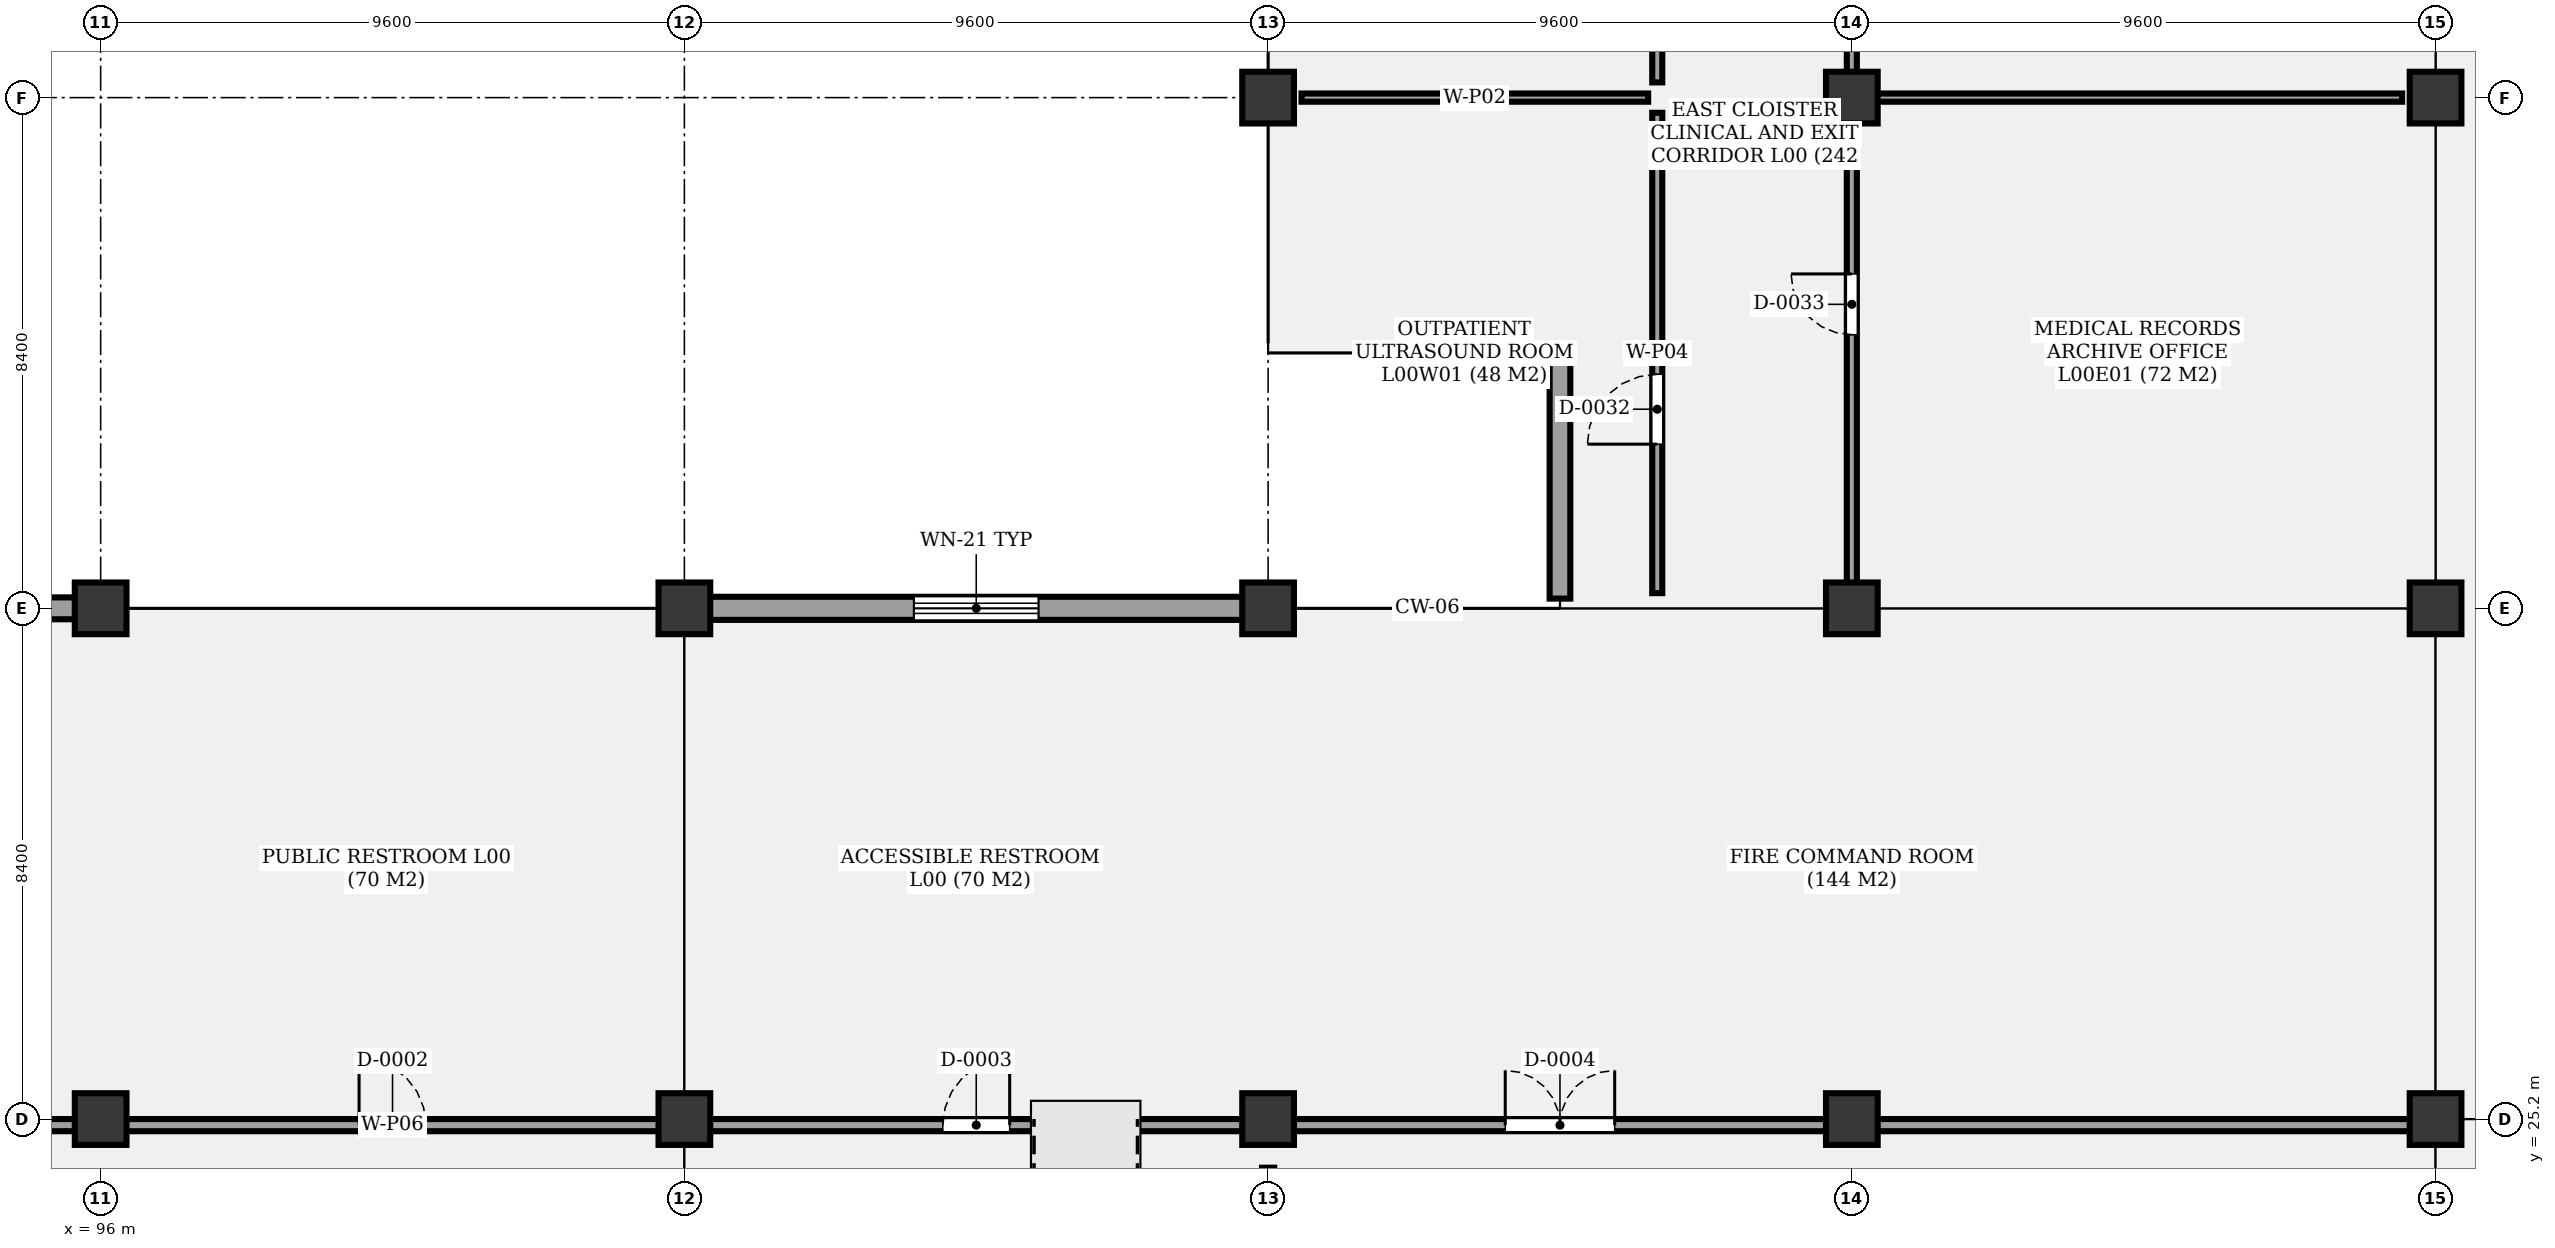
"""IFC4 building model, lengths in metres.
Left out: names, types, materials, properties, quantities, classifications, styles, units other than length and angle.
Written with IfcOpenShell. Run it as: python <this file> out.ifc"""

import sys

from ifc_helpers import new_model, si_unit, direction, frame, frame_2d, origin, origin_2d, place, context, subcontext, project, spatial, rectangle, extrude, element, fill, save


model = new_model("IFC4")
c1 = context("Model", 3, precision=1e-05, world=origin(), true_north=direction((0.0, 1.0)))
c2 = subcontext(c1, "Body", "Model", "MODEL_VIEW")
j1 = project(units=[si_unit("LENGTHUNIT", "METRE"), si_unit("PLANEANGLEUNIT", "RADIAN")], contexts=[c1])
p1 = place(None, origin())
s1 = spatial("IfcSite", under=j1, at=p1, CompositionType="ELEMENT")
p2 = place(p1, origin())
s2 = spatial("IfcBuilding", under=s1, at=p2, CompositionType="ELEMENT")
p3 = place(p2, origin())
s3 = spatial("IfcBuildingStorey", under=s2, at=p3, CompositionType="ELEMENT", Elevation=0.0)
for number, where, z_axis, x_axis in (
    (1, (96.0, 25.2, -0.35), (0.0, 0.0, 1.0), (1.0, 0.0, 0.0)),
    (2, (96.0, 33.6, -0.35), (0.0, 0.0, 1.0), (1.0, 0.0, 0.0)),
    (3, (105.6, 25.2, -0.35), (0.0, 0.0, 1.0), (1.0, 0.0, 0.0)),
    (4, (105.6, 33.6, -0.35), (0.0, 0.0, 1.0), (1.0, 0.0, 0.0)),
    (5, (115.2, 25.2, -0.35), (0.0, 0.0, 1.0), (1.0, 0.0, 0.0)),
    (6, (115.2, 33.6, -0.35), (0.0, 0.0, 1.0), (1.0, 0.0, 0.0)),
    (7, (115.2, 42.0, -0.35), (0.0, 0.0, 1.0), (1.0, 0.0, 0.0)),
    (8, (124.8, 25.2, -0.35), (0.0, 0.0, 1.0), (1.0, 0.0, 0.0)),
    (9, (124.8, 33.6, -0.35), (0.0, 0.0, 1.0), (1.0, 0.0, 0.0)),
    (10, (124.8, 42.0, -0.35), (0.0, 0.0, 1.0), (1.0, 0.0, 0.0)),
    (11, (134.4, 25.2, -0.35), (0.0, 0.0, 1.0), (1.0, 0.0, 0.0)),
    (12, (134.4, 33.6, -0.35), (0.0, 0.0, 1.0), (1.0, 0.0, 0.0)),
    (13, (134.4, 42.0, -0.35), (0.0, 0.0, 1.0), (1.0, 0.0, 0.0)),
):
    element("IfcColumn", number, at=place(p3, frame(where, z_axis=z_axis, x_axis=x_axis)), inside=s3, PredefinedType="COLUMN", context=c2, shape_type="SweptSolid", body=[
        extrude(rectangle(XDim=0.85, YDim=0.85, at=origin_2d()), origin(), (0.0, 0.0, 1.0), 5.45),
    ])
p4 = place(p3, frame((86.4, 33.6, 0.0), z_axis=(0.0, 0.0, 1.0), x_axis=(1.0, 0.0, 0.0)))
e14 = element("IfcWall", 14, at=p4, inside=s3, PredefinedType="SOLIDWALL", context=c2, shape_type="SweptSolid", body=[
    extrude(rectangle(XDim=9.6, YDim=0.36, at=frame_2d((4.8, 0.0))), origin(), (0.0, 0.0, 1.0), 4.24),
])
p5 = place(p4, frame((3.85, 0.0, 0.85)))
e15 = element("IfcOpeningElement", 15, at=p5, cuts=e14, PredefinedType="OPENING", context=c2, shape_type="SweptSolid", body=[
    extrude(rectangle(XDim=1.9, YDim=1.4, at=frame_2d((0.95, 0.7))), frame((0.0, 0.19, 0.0), z_axis=(0.0, -1.0, 0.0), x_axis=(1.0, 0.0, 0.0)), (0.0, 0.0, 1.0), 0.38),
])
p6 = place(p3, frame((105.6, 33.6, 0.0), z_axis=(0.0, 0.0, 1.0), x_axis=(1.0, 0.0, 0.0)))
e16 = element("IfcWall", 16, at=p6, inside=s3, PredefinedType="SOLIDWALL", context=c2, shape_type="SweptSolid", body=[
    extrude(rectangle(XDim=9.6, YDim=0.38, at=frame_2d((4.8, 0.0))), origin(), (0.0, 0.0, 1.0), 4.24),
])
p7 = place(p6, frame((3.775, 0.0, 0.85)))
e17 = element("IfcOpeningElement", 17, at=p7, cuts=e16, PredefinedType="OPENING", context=c2, shape_type="SweptSolid", body=[
    extrude(rectangle(XDim=2.05, YDim=1.4, at=frame_2d((1.025, 0.7))), frame((0.0, 0.2, 0.0), z_axis=(0.0, -1.0, 0.0), x_axis=(1.0, 0.0, 0.0)), (0.0, 0.0, 1.0), 0.4),
])
p8 = place(p3, frame((120.0, 33.76, 0.0), z_axis=(0.0, 0.0, 1.0), x_axis=(0.0, 1.0, 0.0)))
e18 = element("IfcWall", 18, at=p8, inside=s3, PredefinedType="SOLIDWALL", context=c2, shape_type="SweptSolid", body=[
    extrude(rectangle(XDim=3.88, YDim=0.34, at=frame_2d((1.94, 0.0))), origin(), (0.0, 0.0, 1.0), 4.24),
])
p9 = place(p3, frame((67.6, 25.1, 0.0), z_axis=(0.0, 0.0, 1.0), x_axis=(1.0, 0.0, 0.0)))
e19 = element("IfcWall", 19, at=p9, inside=s3, PredefinedType="PARTITIONING", context=c2, shape_type="SweptSolid", body=[
    extrude(rectangle(XDim=66.4, YDim=0.2, at=frame_2d((33.2, 0.0))), origin(), (0.0, 0.0, 1.0), 3.98),
])
p10 = place(p9, frame((12.8, 0.0, 0.0)))
e20 = element("IfcOpeningElement", 20, at=p10, cuts=e19, PredefinedType="OPENING", context=c2, shape_type="SweptSolid", body=[
    extrude(rectangle(XDim=2.4, YDim=2.4, at=frame_2d((1.2, 1.2))), frame((0.0, 0.11, 0.0), z_axis=(0.0, -1.0, 0.0), x_axis=(1.0, 0.0, 0.0)), (0.0, 0.0, 1.0), 0.22),
])
p11 = place(p9, frame((32.65, 0.0, 0.0)))
e21 = element("IfcOpeningElement", 21, at=p11, cuts=e19, PredefinedType="OPENING", context=c2, shape_type="SweptSolid", body=[
    extrude(rectangle(XDim=1.1, YDim=2.1, at=frame_2d((0.55, 1.05))), frame((0.0, 0.11, 0.0), z_axis=(0.0, -1.0, 0.0), x_axis=(1.0, 0.0, 0.0)), (0.0, 0.0, 1.0), 0.22),
])
p12 = place(p9, frame((42.25, 0.0, 0.0)))
e22 = element("IfcOpeningElement", 22, at=p12, cuts=e19, PredefinedType="OPENING", context=c2, shape_type="SweptSolid", body=[
    extrude(rectangle(XDim=1.1, YDim=2.1, at=frame_2d((0.55, 1.05))), frame((0.0, 0.11, 0.0), z_axis=(0.0, -1.0, 0.0), x_axis=(1.0, 0.0, 0.0)), (0.0, 0.0, 1.0), 0.22),
])
p13 = place(p9, frame((51.5, 0.0, 0.0)))
e23 = element("IfcOpeningElement", 23, at=p13, cuts=e19, PredefinedType="OPENING", context=c2, shape_type="SweptSolid", body=[
    extrude(rectangle(XDim=1.8, YDim=2.2, at=frame_2d((0.9, 1.1))), frame((0.0, 0.11, 0.0), z_axis=(0.0, -1.0, 0.0), x_axis=(1.0, 0.0, 0.0)), (0.0, 0.0, 1.0), 0.22),
])
p14 = place(p3, frame((115.2, 9.2, 0.0), z_axis=(0.0, 0.0, 1.0), x_axis=(0.0, 1.0, 0.0)))
e24 = element("IfcWall", 24, at=p14, inside=s3, PredefinedType="PARTITIONING", context=c2, shape_type="SweptSolid", body=[
    extrude(rectangle(XDim=15.2, YDim=0.2, at=frame_2d((7.6, 0.0))), origin(), (0.0, 0.0, 1.0), 3.98),
])
p15 = place(p14, frame((5.15, 0.0, 0.0)))
e25 = element("IfcOpeningElement", 25, at=p15, cuts=e24, PredefinedType="OPENING", context=c2, shape_type="SweptSolid", body=[
    extrude(rectangle(XDim=2.4, YDim=2.4, at=frame_2d((1.2, 1.2))), frame((0.0, 0.11, 0.0), z_axis=(0.0, -1.0, 0.0), x_axis=(1.0, 0.0, 0.0)), (0.0, 0.0, 1.0), 0.22),
])
p16 = place(p3, frame((121.6, 33.85, 0.0), z_axis=(0.0, 0.0, 1.0), x_axis=(0.0, 1.0, 0.0)))
e26 = element("IfcWall", 26, at=p16, inside=s3, PredefinedType="PARTITIONING", context=c2, shape_type="SweptSolid", body=[
    extrude(rectangle(XDim=7.9, YDim=0.165, at=frame_2d((3.95, 0.0))), origin(), (0.0, 0.0, 1.0), 3.98),
])
p17 = place(p16, frame((2.45, 0.0, 0.0)))
e27 = element("IfcOpeningElement", 27, at=p17, cuts=e26, PredefinedType="OPENING", context=c2, shape_type="SweptSolid", body=[
    extrude(rectangle(XDim=1.15, YDim=2.2, at=frame_2d((0.575, 1.1))), frame((0.0, 0.093, 0.0), z_axis=(0.0, -1.0, 0.0), x_axis=(1.0, 0.0, 0.0)), (0.0, 0.0, 1.0), 0.185),
])
p18 = place(p3, frame((124.8, 33.85, 0.0), z_axis=(0.0, 0.0, 1.0), x_axis=(0.0, 1.0, 0.0)))
e28 = element("IfcWall", 28, at=p18, inside=s3, PredefinedType="PARTITIONING", context=c2, shape_type="SweptSolid", body=[
    extrude(rectangle(XDim=7.9, YDim=0.165, at=frame_2d((3.95, 0.0))), origin(), (0.0, 0.0, 1.0), 3.98),
])
p19 = place(p18, frame((4.25, 0.0, 0.0)))
e29 = element("IfcOpeningElement", 29, at=p19, cuts=e28, PredefinedType="OPENING", context=c2, shape_type="SweptSolid", body=[
    extrude(rectangle(XDim=1.0, YDim=2.2, at=frame_2d((0.5, 1.1))), frame((0.0, 0.093, 0.0), z_axis=(0.0, -1.0, 0.0), x_axis=(1.0, 0.0, 0.0)), (0.0, 0.0, 1.0), 0.185),
])
p20 = place(p3, frame((121.6, 42.25, 0.0), z_axis=(0.0, 0.0, 1.0), x_axis=(0.0, 1.0, 0.0)))
e30 = element("IfcWall", 30, at=p20, inside=s3, PredefinedType="PARTITIONING", context=c2, shape_type="SweptSolid", body=[
    extrude(rectangle(XDim=7.9, YDim=0.165, at=frame_2d((3.95, 0.0))), origin(), (0.0, 0.0, 1.0), 3.98),
])
p21 = place(p20, frame((2.45, 0.0, 0.0)))
e31 = element("IfcOpeningElement", 31, at=p21, cuts=e30, PredefinedType="OPENING", context=c2, shape_type="SweptSolid", body=[
    extrude(rectangle(XDim=1.15, YDim=2.2, at=frame_2d((0.575, 1.1))), frame((0.0, 0.093, 0.0), z_axis=(0.0, -1.0, 0.0), x_axis=(1.0, 0.0, 0.0)), (0.0, 0.0, 1.0), 0.185),
])
p22 = place(p3, frame((115.75, 42.0, 0.0), z_axis=(0.0, 0.0, 1.0), x_axis=(1.0, 0.0, 0.0)))
e32 = element("IfcWall", 32, at=p22, inside=s3, PredefinedType="PARTITIONING", context=c2, shape_type="SweptSolid", body=[
    extrude(rectangle(XDim=5.7, YDim=0.135, at=frame_2d((2.85, 0.0))), origin(), (0.0, 0.0, 1.0), 3.98),
])
p23 = place(p3, frame((124.8, 42.25, 0.0), z_axis=(0.0, 0.0, 1.0), x_axis=(0.0, 1.0, 0.0)))
e33 = element("IfcWall", 33, at=p23, inside=s3, PredefinedType="PARTITIONING", context=c2, shape_type="SweptSolid", body=[
    extrude(rectangle(XDim=7.9, YDim=0.165, at=frame_2d((3.95, 0.0))), origin(), (0.0, 0.0, 1.0), 3.98),
])
p24 = place(p23, frame((4.25, 0.0, 0.0)))
e34 = element("IfcOpeningElement", 34, at=p24, cuts=e33, PredefinedType="OPENING", context=c2, shape_type="SweptSolid", body=[
    extrude(rectangle(XDim=0.95, YDim=2.1, at=frame_2d((0.475, 1.05))), frame((0.0, 0.093, 0.0), z_axis=(0.0, -1.0, 0.0), x_axis=(1.0, 0.0, 0.0)), (0.0, 0.0, 1.0), 0.185),
])
p25 = place(p3, frame((124.95, 42.0, 0.0), z_axis=(0.0, 0.0, 1.0), x_axis=(1.0, 0.0, 0.0)))
e35 = element("IfcWall", 35, at=p25, inside=s3, PredefinedType="PARTITIONING", context=c2, shape_type="SweptSolid", body=[
    extrude(rectangle(XDim=8.9, YDim=0.135, at=frame_2d((4.45, 0.0))), origin(), (0.0, 0.0, 1.0), 3.98),
])
p26 = place(p7, origin())
e36 = element("IfcWindow", 36, at=p26, inside=s3, PartitioningType="SINGLE_PANEL", PredefinedType="WINDOW", context=c2, shape_type="SweptSolid", body=[
    extrude(rectangle(XDim=2.05, YDim=1.4, at=frame_2d((1.025, 0.7))), frame((0.0, 0.03, 0.0), z_axis=(0.0, -1.0, 0.0), x_axis=(1.0, 0.0, 0.0)), (0.0, 0.0, 1.0), 0.06),
])
fill(e17, e36)
p27 = place(p11, origin())
e37 = element("IfcDoor", 37, at=p27, inside=s3, OperationType="SINGLE_SWING_LEFT", PredefinedType="DOOR", context=c2, shape_type="SweptSolid", body=[
    extrude(rectangle(XDim=1.1, YDim=2.1, at=frame_2d((0.55, 1.05))), frame((0.0, 0.025, 0.0), z_axis=(0.0, -1.0, 0.0), x_axis=(1.0, 0.0, 0.0)), (0.0, 0.0, 1.0), 0.05),
])
fill(e21, e37)
p28 = place(p12, origin())
e38 = element("IfcDoor", 38, at=p28, inside=s3, OperationType="SINGLE_SWING_RIGHT", PredefinedType="DOOR", context=c2, shape_type="SweptSolid", body=[
    extrude(rectangle(XDim=1.1, YDim=2.1, at=frame_2d((0.55, 1.05))), frame((0.0, 0.025, 0.0), z_axis=(0.0, -1.0, 0.0), x_axis=(1.0, 0.0, 0.0)), (0.0, 0.0, 1.0), 0.05),
])
fill(e22, e38)
p29 = place(p13, origin())
e39 = element("IfcDoor", 39, at=p29, inside=s3, OperationType="DOUBLE_DOOR_SINGLE_SWING", PredefinedType="DOOR", context=c2, shape_type="SweptSolid", body=[
    extrude(rectangle(XDim=1.8, YDim=2.2, at=frame_2d((0.9, 1.1))), frame((0.0, 0.025, 0.0), z_axis=(0.0, -1.0, 0.0), x_axis=(1.0, 0.0, 0.0)), (0.0, 0.0, 1.0), 0.05),
])
fill(e23, e39)
p30 = place(p17, origin())
e40 = element("IfcDoor", 40, at=p30, inside=s3, OperationType="SINGLE_SWING_LEFT", PredefinedType="DOOR", context=c2, shape_type="SweptSolid", body=[
    extrude(rectangle(XDim=1.15, YDim=2.2, at=frame_2d((0.575, 1.1))), frame((0.0, 0.025, 0.0), z_axis=(0.0, -1.0, 0.0), x_axis=(1.0, 0.0, 0.0)), (0.0, 0.0, 1.0), 0.05),
])
fill(e27, e40)
p31 = place(p19, origin())
e41 = element("IfcDoor", 41, at=p31, inside=s3, OperationType="SINGLE_SWING_RIGHT", PredefinedType="DOOR", context=c2, shape_type="SweptSolid", body=[
    extrude(rectangle(XDim=1.0, YDim=2.2, at=frame_2d((0.5, 1.1))), frame((0.0, 0.025, 0.0), z_axis=(0.0, -1.0, 0.0), x_axis=(1.0, 0.0, 0.0)), (0.0, 0.0, 1.0), 0.05),
])
fill(e29, e41)
save(model, sys.argv[1])
